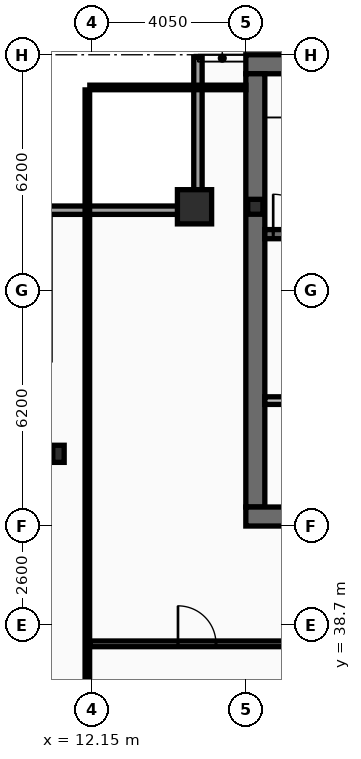
"""IFC4 building model, lengths in metres.
Left out: names, types, materials, properties, quantities, classifications, styles, units other than length and angle.
Written with IfcOpenShell. Run it as: python <this file> out.ifc"""

import sys

from ifc_helpers import new_model, si_unit, direction, frame, frame_2d, origin, origin_2d, place, context, subcontext, project, spatial, rectangle, hollow_rectangle, i_section, extrude, element, fill, save


model = new_model("IFC4")
c1 = context("Model", 3, precision=1e-05, world=origin(), true_north=direction((0.0, 1.0)))
c2 = subcontext(c1, "Body", "Model", "MODEL_VIEW")
j1 = project(units=[si_unit("LENGTHUNIT", "METRE"), si_unit("PLANEANGLEUNIT", "RADIAN")], contexts=[c1])
p1 = place(None, origin())
s1 = spatial("IfcSite", under=j1, at=p1, CompositionType="ELEMENT")
p2 = place(p1, origin())
s2 = spatial("IfcBuilding", under=s1, at=p2, CompositionType="ELEMENT")
p3 = place(p2, frame((0.0, 0.0, 310.2)))
s3 = spatial("IfcBuildingStorey", under=s2, at=p3, CompositionType="ELEMENT", Elevation=310.2)
p4 = place(p3, frame((16.2, 53.45, 0.0), z_axis=(0.0, 0.0, 1.0), x_axis=(1.0, 0.0, 0.0)))
e1 = element("IfcWall", 1, at=p4, inside=s3, PredefinedType="SHEAR", context=c2, shape_type="SweptSolid", body=[
    extrude(rectangle(XDim=40.5, YDim=0.5, at=frame_2d((20.25, 0.0))), origin(), (0.0, 0.0, 1.0), 4.24),
])
p5 = place(p3, frame((16.45, 41.8, 0.0), z_axis=(0.0, 0.0, 1.0), x_axis=(0.0, 1.0, 0.0)))
e2 = element("IfcWall", 2, at=p5, inside=s3, PredefinedType="SHEAR", context=c2, shape_type="SweptSolid", body=[
    extrude(rectangle(XDim=11.4, YDim=0.5, at=frame_2d((5.7, 0.0))), origin(), (0.0, 0.0, 1.0), 4.24),
])
p6 = place(p3, frame((18.65, 41.55, 0.0), z_axis=(0.0, 0.0, 1.0), x_axis=(-1.0, 0.0, 0.0)))
e3 = element("IfcWall", 3, at=p6, inside=s3, PredefinedType="SHEAR", context=c2, shape_type="SweptSolid", body=[
    extrude(rectangle(XDim=2.45, YDim=0.5, at=frame_2d((1.225, 0.0))), origin(), (0.0, 0.0, 1.0), 4.24),
])
p7 = place(p3, frame((16.7, 48.98, 0.0), z_axis=(0.0, 0.0, 1.0), x_axis=(1.0, 0.0, 0.0)))
e4 = element("IfcWall", 4, at=p7, inside=s3, PredefinedType="SHEAR", context=c2, shape_type="SweptSolid", body=[
    extrude(rectangle(XDim=7.52, YDim=0.24, at=frame_2d((3.76, 0.0))), origin(), (0.0, 0.0, 1.0), 4.24),
])
p8 = place(p7, frame((0.22, 0.0, 0.0)))
e5 = element("IfcOpeningElement", 5, at=p8, cuts=e4, PredefinedType="OPENING", context=c2, shape_type="SweptSolid", body=[
    extrude(rectangle(XDim=1.05, YDim=2.15, at=frame_2d((0.525, 1.075))), frame((0.0, 0.13, 0.0), z_axis=(0.0, -1.0, 0.0), x_axis=(1.0, 0.0, 0.0)), (0.0, 0.0, 1.0), 0.26),
])
p9 = place(p3, frame((14.85, 49.7, 0.0), z_axis=(0.0, 0.0, 1.0), x_axis=(1.0, 0.0, 0.0)))
e6 = element("IfcColumn", 6, at=p9, inside=s3, PredefinedType="COLUMN", context=c2, shape_type="SweptSolid", body=[
    extrude(hollow_rectangle(XDim=0.9, YDim=0.9, WallThickness=0.05, at=origin_2d()), origin(), (0.0, 0.0, 1.0), 4.4),
])
p10 = place(p3, frame((11.27, 43.2, 0.0), z_axis=(0.0, 0.0, 1.0), x_axis=(1.0, 0.0, 0.0)))
e7 = element("IfcColumn", 7, at=p10, inside=s3, PredefinedType="COLUMN", context=c2, shape_type="SweptSolid", body=[
    extrude(i_section(OverallWidth=0.3, OverallDepth=0.45, WebThickness=0.014, FlangeThickness=0.026, at=origin_2d()), origin(), (0.0, 0.0, 1.0), 4.4),
])
p11 = place(p3, frame((16.45, 49.7, 0.0), z_axis=(0.0, 0.0, 1.0), x_axis=(1.0, 0.0, 0.0)))
e8 = element("IfcColumn", 8, at=p11, inside=s3, PredefinedType="COLUMN", context=c2, shape_type="SweptSolid", body=[
    extrude(i_section(OverallWidth=0.399, OverallDepth=0.393, WebThickness=0.023, FlangeThickness=0.037, at=origin_2d()), origin(), (0.0, 0.0, 1.0), 4.4),
])
p12 = place(p3, frame((10.83, 49.61, 0.0), z_axis=(0.0, 0.0, 1.0), x_axis=(1.0, 0.0, 0.0)))
e9 = element("IfcWall", 9, at=p12, inside=s3, PredefinedType="SOLIDWALL", context=c2, shape_type="SweptSolid", body=[
    extrude(rectangle(XDim=4.22, YDim=0.22, at=frame_2d((2.11, 0.0))), origin(), (0.0, 0.0, 1.0), 3.68),
])
p13 = place(p3, frame((14.94, 49.72, 0.0), z_axis=(0.0, 0.0, 1.0), x_axis=(0.0, 1.0, 0.0)))
e10 = element("IfcWall", 10, at=p13, inside=s3, PredefinedType="SOLIDWALL", context=c2, shape_type="SweptSolid", body=[
    extrude(rectangle(XDim=3.91, YDim=0.22, at=frame_2d((1.955, 0.0))), origin(), (0.0, 0.0, 1.0), 3.68),
])
p14 = place(p3, frame((16.7, 44.6, 0.0), z_axis=(0.0, 0.0, 1.0), x_axis=(1.0, 0.0, 0.0)))
e11 = element("IfcWall", 11, at=p14, inside=s3, PredefinedType="PARTITIONING", context=c2, shape_type="SweptSolid", body=[
    extrude(rectangle(XDim=4.3, YDim=0.2, at=frame_2d((2.15, 0.0))), origin(), (0.0, 0.0, 1.0), 4.24),
])
p15 = place(p14, frame((1.25, 0.0, 0.0)))
e12 = element("IfcOpeningElement", 12, at=p15, cuts=e11, PredefinedType="OPENING", context=c2, shape_type="SweptSolid", body=[
    extrude(rectangle(XDim=1.05, YDim=2.15, at=frame_2d((0.525, 1.075))), frame((0.0, 0.11, 0.0), z_axis=(0.0, -1.0, 0.0), x_axis=(1.0, 0.0, 0.0)), (0.0, 0.0, 1.0), 0.22),
])
p16 = place(p3, frame((12.095, 38.2, 0.0), z_axis=(0.0, 0.0, 1.0), x_axis=(1.0, 0.0, 0.0)))
e13 = element("IfcWall", 13, at=p16, inside=s3, PredefinedType="PARTITIONING", context=c2, shape_type="SweptSolid", body=[
    extrude(rectangle(XDim=6.455, YDim=0.15, at=frame_2d((3.228, 0.0))), origin(), (0.0, 0.0, 1.0), 3.63),
])
p17 = place(p16, frame((2.32, 0.0, 0.0)))
e14 = element("IfcOpeningElement", 14, at=p17, cuts=e13, PredefinedType="OPENING", context=c2, shape_type="SweptSolid", body=[
    extrude(rectangle(XDim=1.0, YDim=2.05, at=frame_2d((0.5, 1.025))), frame((0.0, 0.085, 0.0), z_axis=(0.0, -1.0, 0.0), x_axis=(1.0, 0.0, 0.0)), (0.0, 0.0, 1.0), 0.17),
])
p18 = place(p3, frame((12.03, 10.665, 0.0), z_axis=(0.0, 0.0, 1.0), x_axis=(0.0, 1.0, 0.0)))
e15 = element("IfcWall", 15, at=p18, inside=s3, PredefinedType="PARTITIONING", context=c2, shape_type="SweptSolid", body=[
    extrude(rectangle(XDim=42.11, YDim=0.12, at=frame_2d((21.055, 0.0))), origin(), (0.0, 0.0, 1.0), 3.63),
])
p19 = place(p3, frame((12.095, 52.84, 0.0), z_axis=(0.0, 0.0, 1.0), x_axis=(1.0, 0.0, 0.0)))
e16 = element("IfcWall", 16, at=p19, inside=s3, PredefinedType="PARTITIONING", context=c2, shape_type="SweptSolid", body=[
    extrude(rectangle(XDim=4.105, YDim=0.12, at=frame_2d((2.052, 0.0))), origin(), (0.0, 0.0, 1.0), 4.24),
])
p20 = place(p8, origin())
e17 = element("IfcDoor", 17, at=p20, inside=s3, OperationType="SINGLE_SWING_LEFT", PredefinedType="DOOR", context=c2, shape_type="SweptSolid", body=[
    extrude(rectangle(XDim=1.05, YDim=2.15, at=frame_2d((0.525, 1.075))), frame((0.0, 0.025, 0.0), z_axis=(0.0, -1.0, 0.0), x_axis=(1.0, 0.0, 0.0)), (0.0, 0.0, 1.0), 0.05),
])
fill(e5, e17)
p21 = place(p17, origin())
e18 = element("IfcDoor", 18, at=p21, inside=s3, OperationType="SINGLE_SWING_LEFT", PredefinedType="DOOR", context=c2, shape_type="SweptSolid", body=[
    extrude(rectangle(XDim=1.0, YDim=2.05, at=frame_2d((0.5, 1.025))), frame((0.0, 0.025, 0.0), z_axis=(0.0, -1.0, 0.0), x_axis=(1.0, 0.0, 0.0)), (0.0, 0.0, 1.0), 0.05),
])
fill(e14, e18)
save(model, sys.argv[1])
